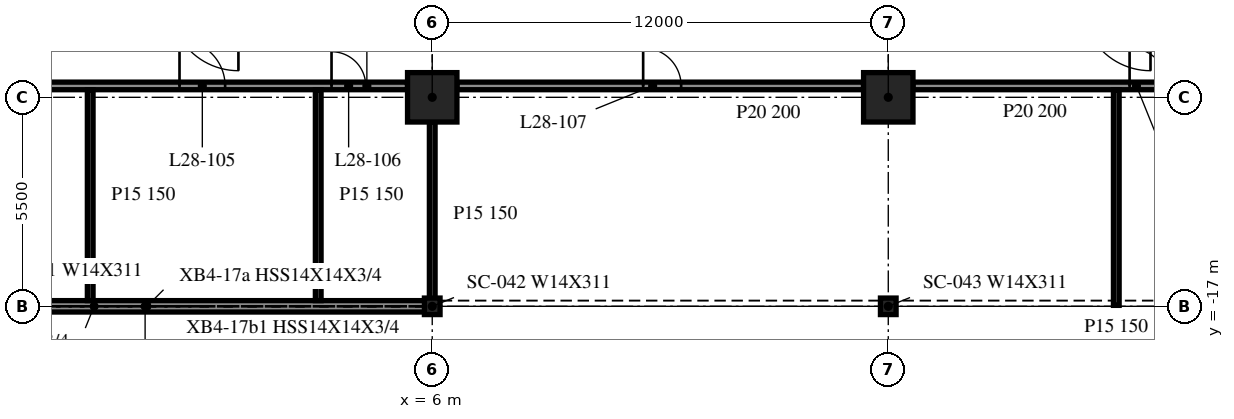
"""IFC4 building model, lengths in metres.
Left out: names, types, materials, properties, quantities, classifications, styles, units other than length and angle.
Written with IfcOpenShell. Run it as: python <this file> out.ifc"""

import sys

from ifc_helpers import new_model, si_unit, direction, frame, frame_2d, origin, origin_2d, place, context, subcontext, project, spatial, rectangle, i_section, extrude, element, fill, save


model = new_model("IFC4")
c1 = context("Model", 3, precision=1e-05, world=origin(), true_north=direction((0.0, 1.0)))
c2 = subcontext(c1, "Body", "Model", "MODEL_VIEW")
j1 = project(units=[si_unit("LENGTHUNIT", "METRE"), si_unit("PLANEANGLEUNIT", "RADIAN")], contexts=[c1])
p1 = place(None, origin())
s1 = spatial("IfcSite", under=j1, at=p1, CompositionType="ELEMENT")
p2 = place(p1, origin())
s2 = spatial("IfcBuilding", under=s1, at=p2, CompositionType="ELEMENT")
p3 = place(p2, frame((0.0, 0.0, 122.0)))
s3 = spatial("IfcBuildingStorey", under=s2, at=p3, CompositionType="ELEMENT", Elevation=122.0)
for number, where, z_axis, x_axis in (
    (1, (6.0, -11.5, -0.34), (0.0, 0.0, 1.0), (1.0, 0.0, 0.0)),
    (2, (18.0, -11.5, -0.34), (0.0, 0.0, 1.0), (1.0, 0.0, 0.0)),
):
    element("IfcColumn", number, at=place(p3, frame(where, z_axis=z_axis, x_axis=x_axis)), inside=s3, PredefinedType="COLUMN", context=c2, shape_type="SweptSolid", body=[
        extrude(rectangle(XDim=1.3, YDim=1.3, at=origin_2d()), origin(), (0.0, 0.0, 1.0), 4.1),
    ])
for number, where, z_axis, x_axis in (
    (3, (6.0, -17.0, -0.34), (0.0, 0.0, 1.0), (1.0, 0.0, 0.0)),
    (4, (18.0, -17.0, -0.34), (0.0, 0.0, 1.0), (1.0, 0.0, 0.0)),
):
    element("IfcColumn", number, at=place(p3, frame(where, z_axis=z_axis, x_axis=x_axis)), inside=s3, PredefinedType="COLUMN", context=c2, shape_type="SweptSolid", body=[
        extrude(i_section(OverallWidth=0.412, OverallDepth=0.434, WebThickness=0.036, FlangeThickness=0.057, at=origin_2d()), origin(), (0.0, 0.0, 1.0), 4.1),
    ])
p4 = place(p3, frame((-5.982, -17.0, 0.0), z_axis=(0.0, 0.0, 1.0), x_axis=(1.0, 0.0, 0.0)))
e5 = element("IfcWall", 5, at=p4, inside=s3, PredefinedType="NOTDEFINED", context=c2, shape_type="SweptSolid", body=[
    extrude(rectangle(XDim=11.964, YDim=0.3, at=frame_2d((5.982, 0.0))), origin(), (0.0, 0.0, 1.0), 3.003),
])
p5 = place(p3, frame((-5.35, -11.2, 0.0), z_axis=(0.0, 0.0, 1.0), x_axis=(1.0, 0.0, 0.0)))
e6 = element("IfcWall", 6, at=p5, inside=s3, PredefinedType="PARTITIONING", context=c2, shape_type="SweptSolid", body=[
    extrude(rectangle(XDim=10.7, YDim=0.2, at=frame_2d((5.35, 0.0))), origin(), (0.0, 0.0, 1.0), 3.76),
])
p6 = place(p5, frame((4.7, 0.0, 0.0)))
e7 = element("IfcOpeningElement", 7, at=p6, cuts=e6, PredefinedType="OPENING", context=c2, shape_type="SweptSolid", body=[
    extrude(rectangle(XDim=1.2, YDim=2.1, at=frame_2d((0.6, 1.05))), frame((0.0, 0.11, 0.0), z_axis=(0.0, -1.0, 0.0), x_axis=(1.0, 0.0, 0.0)), (0.0, 0.0, 1.0), 0.22),
])
p7 = place(p5, frame((8.7, 0.0, 0.0)))
e8 = element("IfcOpeningElement", 8, at=p7, cuts=e6, PredefinedType="OPENING", context=c2, shape_type="SweptSolid", body=[
    extrude(rectangle(XDim=0.9, YDim=2.1, at=frame_2d((0.45, 1.05))), frame((0.0, 0.11, 0.0), z_axis=(0.0, -1.0, 0.0), x_axis=(1.0, 0.0, 0.0)), (0.0, 0.0, 1.0), 0.22),
])
p8 = place(p3, frame((6.65, -11.2, 0.0), z_axis=(0.0, 0.0, 1.0), x_axis=(1.0, 0.0, 0.0)))
e9 = element("IfcWall", 9, at=p8, inside=s3, PredefinedType="PARTITIONING", context=c2, shape_type="SweptSolid", body=[
    extrude(rectangle(XDim=10.7, YDim=0.2, at=frame_2d((5.35, 0.0))), origin(), (0.0, 0.0, 1.0), 3.76),
])
p9 = place(p8, frame((4.9, 0.0, 0.0)))
e10 = element("IfcOpeningElement", 10, at=p9, cuts=e9, PredefinedType="OPENING", context=c2, shape_type="SweptSolid", body=[
    extrude(rectangle(XDim=1.0, YDim=2.1, at=frame_2d((0.5, 1.05))), frame((0.0, 0.11, 0.0), z_axis=(0.0, -1.0, 0.0), x_axis=(1.0, 0.0, 0.0)), (0.0, 0.0, 1.0), 0.22),
])
p10 = place(p3, frame((18.65, -11.2, 0.0), z_axis=(0.0, 0.0, 1.0), x_axis=(1.0, 0.0, 0.0)))
e11 = element("IfcWall", 11, at=p10, inside=s3, PredefinedType="PARTITIONING", context=c2, shape_type="SweptSolid", body=[
    extrude(rectangle(XDim=10.7, YDim=0.2, at=frame_2d((5.35, 0.0))), origin(), (0.0, 0.0, 1.0), 3.76),
])
p11 = place(p10, frame((5.7, 0.0, 0.0)))
e12 = element("IfcOpeningElement", 12, at=p11, cuts=e11, PredefinedType="OPENING", context=c2, shape_type="SweptSolid", body=[
    extrude(rectangle(XDim=1.0, YDim=2.1, at=frame_2d((0.5, 1.05))), frame((0.0, 0.11, 0.0), z_axis=(0.0, -1.0, 0.0), x_axis=(1.0, 0.0, 0.0)), (0.0, 0.0, 1.0), 0.22),
])
for number, where, z_axis, x_axis in (
    (13, (-3.0, -16.85, 0.0), (0.0, 0.0, 1.0), (0.0, 1.0, 0.0)),
    (14, (3.0, -16.85, 0.0), (0.0, 0.0, 1.0), (0.0, 1.0, 0.0)),
):
    element("IfcWall", number, at=place(p3, frame(where, z_axis=z_axis, x_axis=x_axis)), inside=s3, PredefinedType="PARTITIONING", context=c2, shape_type="SweptSolid", body=[
        extrude(rectangle(XDim=5.55, YDim=0.15, at=frame_2d((2.775, 0.0))), origin(), (0.0, 0.0, 1.0), 3.76),
    ])
p12 = place(p3, frame((6.0, -16.975, 0.0), z_axis=(0.0, 0.0, 1.0), x_axis=(0.0, 1.0, 0.0)))
e15 = element("IfcWall", 15, at=p12, inside=s3, PredefinedType="PARTITIONING", context=c2, shape_type="SweptSolid", body=[
    extrude(rectangle(XDim=4.825, YDim=0.15, at=frame_2d((2.413, 0.0))), origin(), (0.0, 0.0, 1.0), 3.76),
])
p13 = place(p3, frame((24.0, -16.975, 0.0), z_axis=(0.0, 0.0, 1.0), x_axis=(0.0, 1.0, 0.0)))
e16 = element("IfcWall", 16, at=p13, inside=s3, PredefinedType="PARTITIONING", context=c2, shape_type="SweptSolid", body=[
    extrude(rectangle(XDim=5.675, YDim=0.15, at=frame_2d((2.837, 0.0))), origin(), (0.0, 0.0, 1.0), 3.76),
])
p14 = place(p6, origin())
e17 = element("IfcDoor", 17, at=p14, inside=s3, OperationType="SINGLE_SWING_RIGHT", PredefinedType="DOOR", context=c2, shape_type="SweptSolid", body=[
    extrude(rectangle(XDim=1.2, YDim=2.1, at=frame_2d((0.6, 1.05))), frame((0.0, 0.025, 0.0), z_axis=(0.0, -1.0, 0.0), x_axis=(1.0, 0.0, 0.0)), (0.0, 0.0, 1.0), 0.05),
])
fill(e7, e17)
p15 = place(p7, origin())
e18 = element("IfcDoor", 18, at=p15, inside=s3, OperationType="SINGLE_SWING_LEFT", PredefinedType="DOOR", context=c2, shape_type="SweptSolid", body=[
    extrude(rectangle(XDim=0.9, YDim=2.1, at=frame_2d((0.45, 1.05))), frame((0.0, 0.025, 0.0), z_axis=(0.0, -1.0, 0.0), x_axis=(1.0, 0.0, 0.0)), (0.0, 0.0, 1.0), 0.05),
])
fill(e8, e18)
p16 = place(p9, origin())
e19 = element("IfcDoor", 19, at=p16, inside=s3, OperationType="SINGLE_SWING_LEFT", PredefinedType="DOOR", context=c2, shape_type="SweptSolid", body=[
    extrude(rectangle(XDim=1.0, YDim=2.1, at=frame_2d((0.5, 1.05))), frame((0.0, 0.025, 0.0), z_axis=(0.0, -1.0, 0.0), x_axis=(1.0, 0.0, 0.0)), (0.0, 0.0, 1.0), 0.05),
])
fill(e10, e19)
p17 = place(p11, origin())
e20 = element("IfcDoor", 20, at=p17, inside=s3, OperationType="SINGLE_SWING_LEFT", PredefinedType="DOOR", context=c2, shape_type="SweptSolid", body=[
    extrude(rectangle(XDim=1.0, YDim=2.1, at=frame_2d((0.5, 1.05))), frame((0.0, 0.025, 0.0), z_axis=(0.0, -1.0, 0.0), x_axis=(1.0, 0.0, 0.0)), (0.0, 0.0, 1.0), 0.05),
])
fill(e12, e20)
save(model, sys.argv[1])
